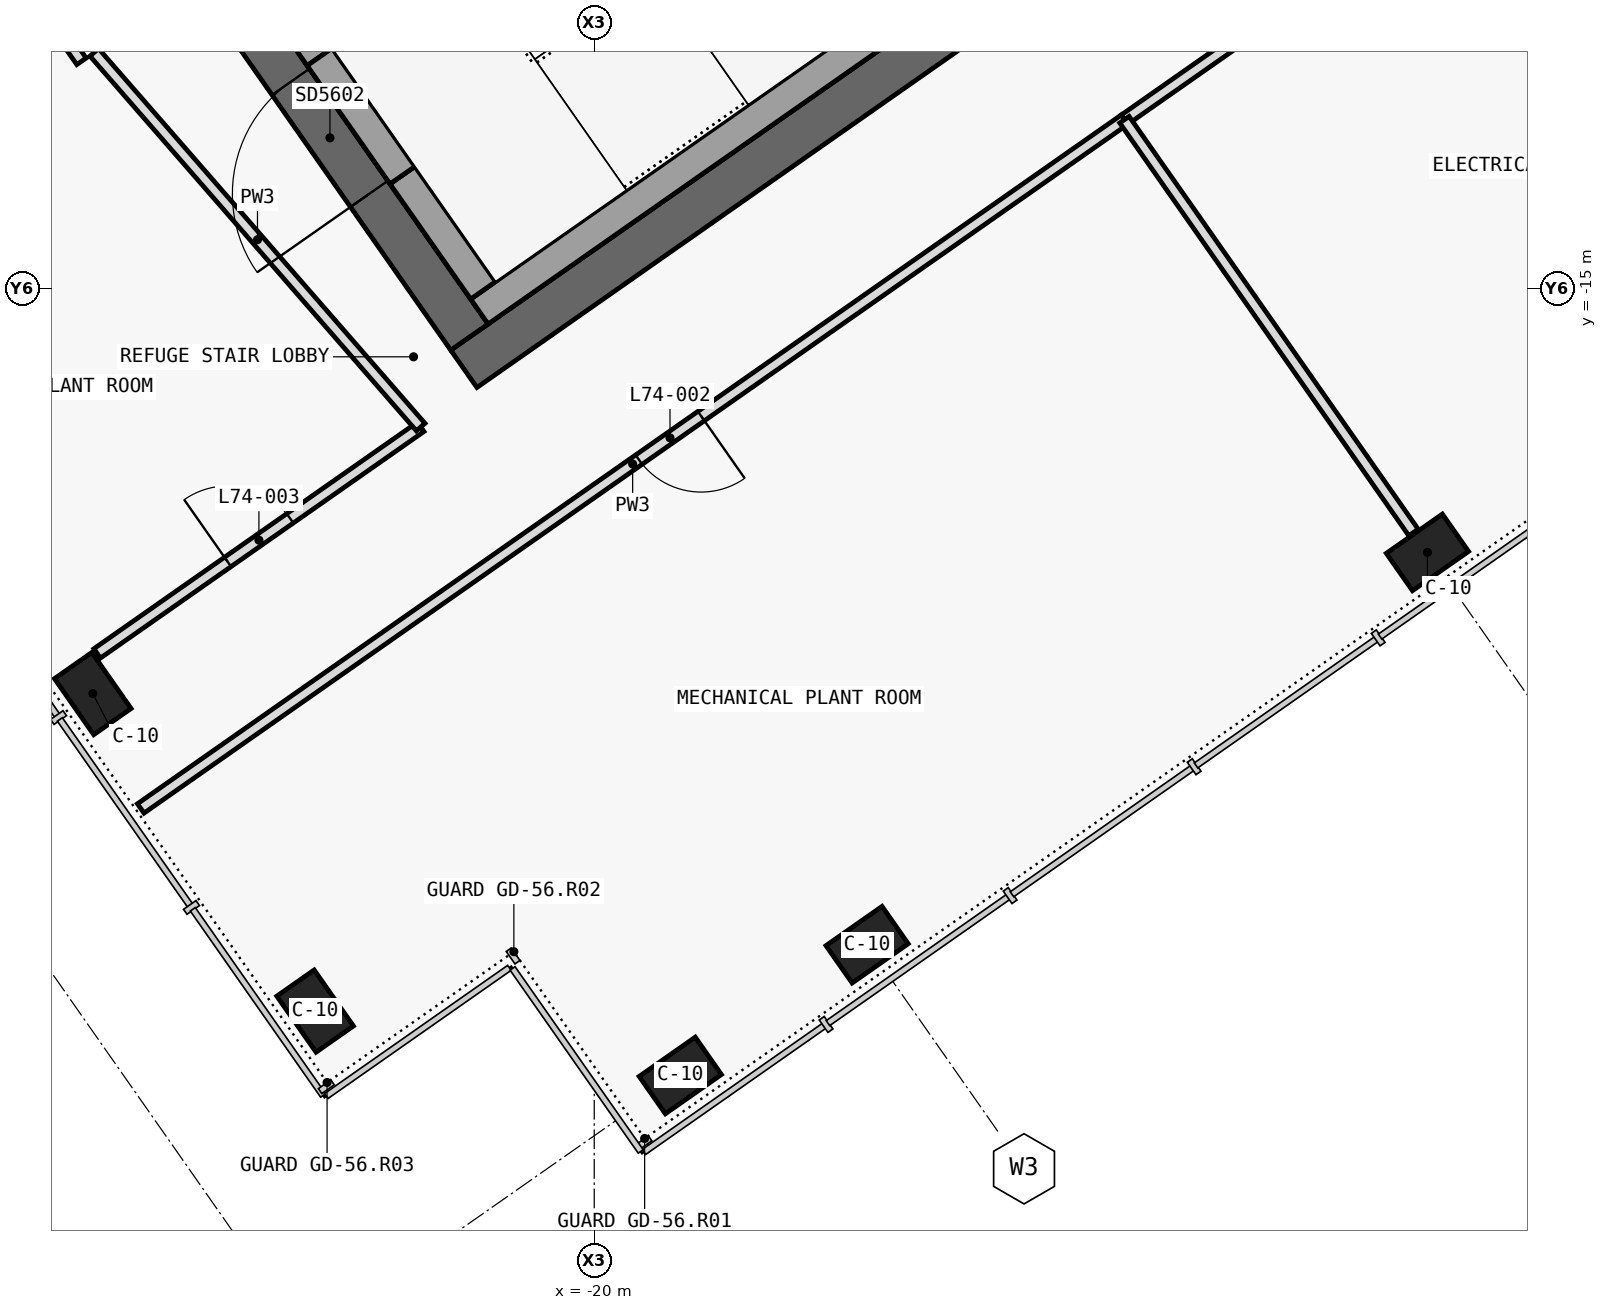
"""IFC4 building model, lengths in metres.
Left out: names, types, materials, properties, quantities, classifications, styles, units other than length and angle.
Written with IfcOpenShell. Run it as: python <this file> out.ifc"""

import sys

from ifc_helpers import new_model, si_unit, direction, frame, frame_2d, origin, origin_2d, place, context, subcontext, project, spatial, polyline, rectangle, outline, extrude, element, fill, save


model = new_model("IFC4")
c1 = context("Model", 3, precision=1e-05, world=origin(), true_north=direction((0.0, 1.0)))
c2 = subcontext(c1, "Body", "Model", "MODEL_VIEW")
j1 = project(units=[si_unit("LENGTHUNIT", "METRE"), si_unit("PLANEANGLEUNIT", "RADIAN")], contexts=[c1])
p1 = place(None, origin())
s1 = spatial("IfcSite", under=j1, at=p1, CompositionType="ELEMENT")
p2 = place(p1, origin())
s2 = spatial("IfcBuilding", under=s1, at=p2, CompositionType="ELEMENT")
p3 = place(p2, frame((0.0, 0.0, 313.3)))
s3 = spatial("IfcBuildingStorey", under=s2, at=p3, CompositionType="ELEMENT", Elevation=313.3)
p4 = place(p3, frame((-0.028, -0.874, 0.0), z_axis=(0.0, 0.0, 1.0), x_axis=(-0.819150035022, -0.573579305871, 0.0)))
e1 = element("IfcWall", 1, at=p4, inside=s3, PredefinedType="SHEAR", context=c2, shape_type="SweptSolid", body=[
    extrude(outline(polyline([(26.476, 0.3), (0.42, 0.3), (0.0, -0.3), (26.476, -0.3), (26.476, 0.3)])), origin(), (0.0, 0.0, 1.0), 5.5),
])
p5 = place(p4, frame((3.676, 0.0, 0.0)))
e2 = element("IfcOpeningElement", 2, at=p5, cuts=e1, PredefinedType="OPENING", context=c2, shape_type="SweptSolid", body=[
    extrude(rectangle(XDim=1.2, YDim=2.1, at=frame_2d((0.6, 1.05))), frame((0.0, 0.31, 0.0), z_axis=(0.0, -1.0, 0.0), x_axis=(1.0, 0.0, 0.0)), (0.0, 0.0, 1.0), 0.62),
])
p6 = place(p4, frame((12.376, 0.0, 0.0)))
e3 = element("IfcOpeningElement", 3, at=p6, cuts=e1, PredefinedType="OPENING", context=c2, shape_type="SweptSolid", body=[
    extrude(rectangle(XDim=1.2, YDim=2.1, at=frame_2d((0.6, 1.05))), frame((0.0, 0.31, 0.0), z_axis=(0.0, -1.0, 0.0), x_axis=(1.0, 0.0, 0.0)), (0.0, 0.0, 1.0), 0.62),
])
p7 = place(p3, frame((-21.642, -15.642, 0.0), z_axis=(0.0, 0.0, 1.0), x_axis=(-0.573586866468, 0.819144740944, 0.0)))
e4 = element("IfcWall", 4, at=p7, inside=s3, PredefinedType="SHEAR", context=c2, shape_type="SweptSolid", body=[
    extrude(outline(polyline([(0.0, 0.3), (0.0, -0.3), (10.0, -0.3), (10.0, 0.3), (0.0, 0.3)])), origin(), (0.0, 0.0, 1.0), 5.5),
])
p8 = place(p7, frame((6.5, 0.0, 0.0)))
e5 = element("IfcOpeningElement", 5, at=p8, cuts=e4, PredefinedType="OPENING", context=c2, shape_type="SweptSolid", body=[
    extrude(rectangle(XDim=1.8, YDim=2.1, at=frame_2d((0.9, 1.05))), frame((0.0, 0.31, 0.0), z_axis=(0.0, -1.0, 0.0), x_axis=(1.0, 0.0, 0.0)), (0.0, 0.0, 1.0), 0.62),
])
p9 = place(p7, frame((2.3, 0.0, 0.0)))
e6 = element("IfcOpeningElement", 6, at=p9, cuts=e4, PredefinedType="OPENING", context=c2, shape_type="SweptSolid", body=[
    extrude(rectangle(XDim=1.8, YDim=2.1, at=frame_2d((0.9, 1.05))), frame((0.0, 0.31, 0.0), z_axis=(0.0, -1.0, 0.0), x_axis=(1.0, 0.0, 0.0)), (0.0, 0.0, 1.0), 0.62),
])
for number, where, z_axis, x_axis in (
    (7, (-9.038, -18.475, 0.0), (0.0, 0.0, 1.0), (-0.819, -0.574, 0.0)),
    (8, (-16.41, -23.637, 0.0), (0.0, 0.0, 1.0), (-0.819, -0.574, 0.0)),
    (9, (-18.867, -25.358, 0.0), (0.0, 0.0, 1.0), (-0.819, -0.574, 0.0)),
    (10, (-23.672, -24.51, 0.0), (0.0, 0.0, 1.0), (-0.574, 0.819, 0.0)),
    (11, (-26.598, -20.333, 0.0), (0.0, 0.0, 1.0), (-0.574, 0.819, 0.0)),
):
    element("IfcColumn", number, at=place(p3, frame(where, z_axis=z_axis, x_axis=x_axis)), inside=s3, PredefinedType="COLUMN", context=c2, shape_type="SweptSolid", body=[
        extrude(rectangle(XDim=0.9, YDim=0.6, at=origin_2d()), origin(), (0.0, 0.0, 1.0), 5.5),
    ])
p10 = place(p3, frame((-14.753, -10.574, 0.0), z_axis=(0.0, 0.0, 1.0), x_axis=(-0.819158229677, -0.573567602601, 0.0)))
e12 = element("IfcWall", 12, at=p10, inside=s3, PredefinedType="SOLIDWALL", context=c2, shape_type="SweptSolid", body=[
    extrude(rectangle(XDim=8.25, YDim=0.4, at=frame_2d((4.125, 0.0))), origin(), (0.0, 0.0, 1.0), 5.22),
])
p11 = place(p3, frame((-21.462, -15.028, 0.0), z_axis=(0.0, 0.0, 1.0), x_axis=(-0.573559770908, 0.819163713305, 0.0)))
e13 = element("IfcWall", 13, at=p11, inside=s3, PredefinedType="SOLIDWALL", context=c2, shape_type="SweptSolid", body=[
    extrude(rectangle(XDim=1.85, YDim=0.4, at=frame_2d((0.925, 0.0))), origin(), (0.0, 0.0, 1.0), 5.22),
])
p12 = place(p3, frame((-23.613, -11.956, 0.0), z_axis=(0.0, 0.0, 1.0), x_axis=(-0.573435029941, 0.819251039936, 0.0)))
e14 = element("IfcWall", 14, at=p12, inside=s3, PredefinedType="SOLIDWALL", context=c2, shape_type="SweptSolid", body=[
    extrude(rectangle(XDim=0.6, YDim=0.4, at=frame_2d((0.3, 0.0))), origin(), (0.0, 0.0, 1.0), 5.22),
])
p13 = place(p3, frame((-22.523, -13.512, 2.15), z_axis=(0.0, 0.0, 1.0), x_axis=(-0.573591692345, 0.819141361715, 0.0)))
e15 = element("IfcWall", 15, at=p13, inside=s3, PredefinedType="SOLIDWALL", context=c2, shape_type="SweptSolid", body=[
    extrude(rectangle(XDim=1.9, YDim=0.4, at=frame_2d((0.95, 0.0))), origin(), (0.0, 0.0, 1.0), 3.07),
])
p14 = place(p3, frame((-26.54, -19.804, 0.0), z_axis=(0.0, 0.0, 1.0), x_axis=(0.819163496387, 0.573560080713, 0.0)))
e16 = element("IfcWall", 16, at=p14, inside=s3, PredefinedType="PARTITIONING", context=c2, shape_type="SweptSolid", body=[
    extrude(rectangle(XDim=5.197, YDim=0.15, at=frame_2d((2.598, 0.0))), origin(), (0.0, 0.0, 1.0), 5.2),
])
p15 = place(p14, frame((2.098, 0.0, 0.0)))
e17 = element("IfcOpeningElement", 17, at=p15, cuts=e16, PredefinedType="OPENING", context=c2, shape_type="SweptSolid", body=[
    extrude(rectangle(XDim=1.0, YDim=2.1, at=frame_2d((0.5, 1.05))), frame((0.0, 0.085, 0.0), z_axis=(0.0, -1.0, 0.0), x_axis=(1.0, 0.0, 0.0)), (0.0, 0.0, 1.0), 0.17),
])
p16 = place(p3, frame((-5.652, -7.62, 0.0), z_axis=(0.0, 0.0, 1.0), x_axis=(-0.81915291695, -0.57357519006, 0.0)))
e18 = element("IfcWall", 18, at=p16, inside=s3, PredefinedType="PARTITIONING", context=c2, shape_type="SweptSolid", body=[
    extrude(rectangle(XDim=9.002, YDim=0.15, at=frame_2d((4.501, 0.0))), origin(), (0.0, 0.0, 1.0), 5.2),
])
p17 = place(p16, frame((4.001, 0.0, 0.0)))
e19 = element("IfcOpeningElement", 19, at=p17, cuts=e18, PredefinedType="OPENING", context=c2, shape_type="SweptSolid", body=[
    extrude(rectangle(XDim=1.0, YDim=2.1, at=frame_2d((0.5, 1.05))), frame((0.0, 0.085, 0.0), z_axis=(0.0, -1.0, 0.0), x_axis=(1.0, 0.0, 0.0)), (0.0, 0.0, 1.0), 0.17),
])
p18 = place(p3, frame((-13.022, -12.781, 0.0), z_axis=(0.0, 0.0, 1.0), x_axis=(-0.819154247226, -0.573573290217, 0.0)))
e20 = element("IfcWall", 20, at=p18, inside=s3, PredefinedType="PARTITIONING", context=c2, shape_type="SweptSolid", body=[
    extrude(rectangle(XDim=15.802, YDim=0.15, at=frame_2d((7.901, 0.0))), origin(), (0.0, 0.0, 1.0), 5.2),
])
p19 = place(p18, frame((6.801, 0.0, 0.0)))
e21 = element("IfcOpeningElement", 21, at=p19, cuts=e20, PredefinedType="OPENING", context=c2, shape_type="SweptSolid", body=[
    extrude(rectangle(XDim=1.0, YDim=2.1, at=frame_2d((0.5, 1.05))), frame((0.0, 0.085, 0.0), z_axis=(0.0, -1.0, 0.0), x_axis=(1.0, 0.0, 0.0)), (0.0, 0.0, 1.0), 0.17),
])
p20 = place(p3, frame((-26.746, -12.014, 0.0), z_axis=(0.0, 0.0, 1.0), x_axis=(-0.573568836472, 0.819157365729, 0.0)))
e22 = element("IfcWall", 22, at=p20, inside=s3, PredefinedType="PARTITIONING", context=c2, shape_type="SweptSolid", body=[
    extrude(rectangle(XDim=2.0, YDim=0.15, at=frame_2d((1.0, 0.0))), origin(), (0.0, 0.0, 1.0), 5.2),
])
p21 = place(p3, frame((-22.284, -16.826, 0.0), z_axis=(0.0, 0.0, 1.0), x_axis=(-0.656758142177, 0.754101281449, 0.0)))
e23 = element("IfcWall", 23, at=p21, inside=s3, PredefinedType="PARTITIONING", context=c2, shape_type="SweptSolid", body=[
    extrude(rectangle(XDim=6.539, YDim=0.15, at=frame_2d((3.269, 0.0))), origin(), (0.0, 0.0, 1.0), 5.2),
])
p22 = place(p3, frame((-9.221, -18.213, 0.0), z_axis=(0.0, 0.0, 1.0), x_axis=(-0.573556251799, 0.819166177294, 0.0)))
e24 = element("IfcWall", 24, at=p22, inside=s3, PredefinedType="PARTITIONING", context=c2, shape_type="SweptSolid", body=[
    extrude(rectangle(XDim=6.63, YDim=0.15, at=frame_2d((3.315, 0.0))), origin(), (0.0, 0.0, 1.0), 5.2),
])
p23 = place(p9, origin())
e25 = element("IfcDoor", 25, at=p23, inside=s3, OperationType="DOUBLE_DOOR_SINGLE_SWING", PredefinedType="DOOR", context=c2, shape_type="SweptSolid", body=[
    extrude(rectangle(XDim=1.8, YDim=2.1, at=frame_2d((0.9, 1.05))), frame((0.0, 0.025, 0.0), z_axis=(0.0, -1.0, 0.0), x_axis=(1.0, 0.0, 0.0)), (0.0, 0.0, 1.0), 0.05),
])
fill(e6, e25)
p24 = place(p19, origin())
e26 = element("IfcDoor", 26, at=p24, inside=s3, OperationType="SINGLE_SWING_LEFT", PredefinedType="DOOR", context=c2, shape_type="SweptSolid", body=[
    extrude(rectangle(XDim=1.0, YDim=2.1, at=frame_2d((0.5, 1.05))), frame((0.0, 0.025, 0.0), z_axis=(0.0, -1.0, 0.0), x_axis=(1.0, 0.0, 0.0)), (0.0, 0.0, 1.0), 0.05),
])
fill(e21, e26)
p25 = place(p15, origin())
e27 = element("IfcDoor", 27, at=p25, inside=s3, OperationType="SINGLE_SWING_RIGHT", PredefinedType="DOOR", context=c2, shape_type="SweptSolid", body=[
    extrude(rectangle(XDim=1.0, YDim=2.1, at=frame_2d((0.5, 1.05))), frame((0.0, 0.025, 0.0), z_axis=(0.0, -1.0, 0.0), x_axis=(1.0, 0.0, 0.0)), (0.0, 0.0, 1.0), 0.05),
])
fill(e17, e27)
save(model, sys.argv[1])
